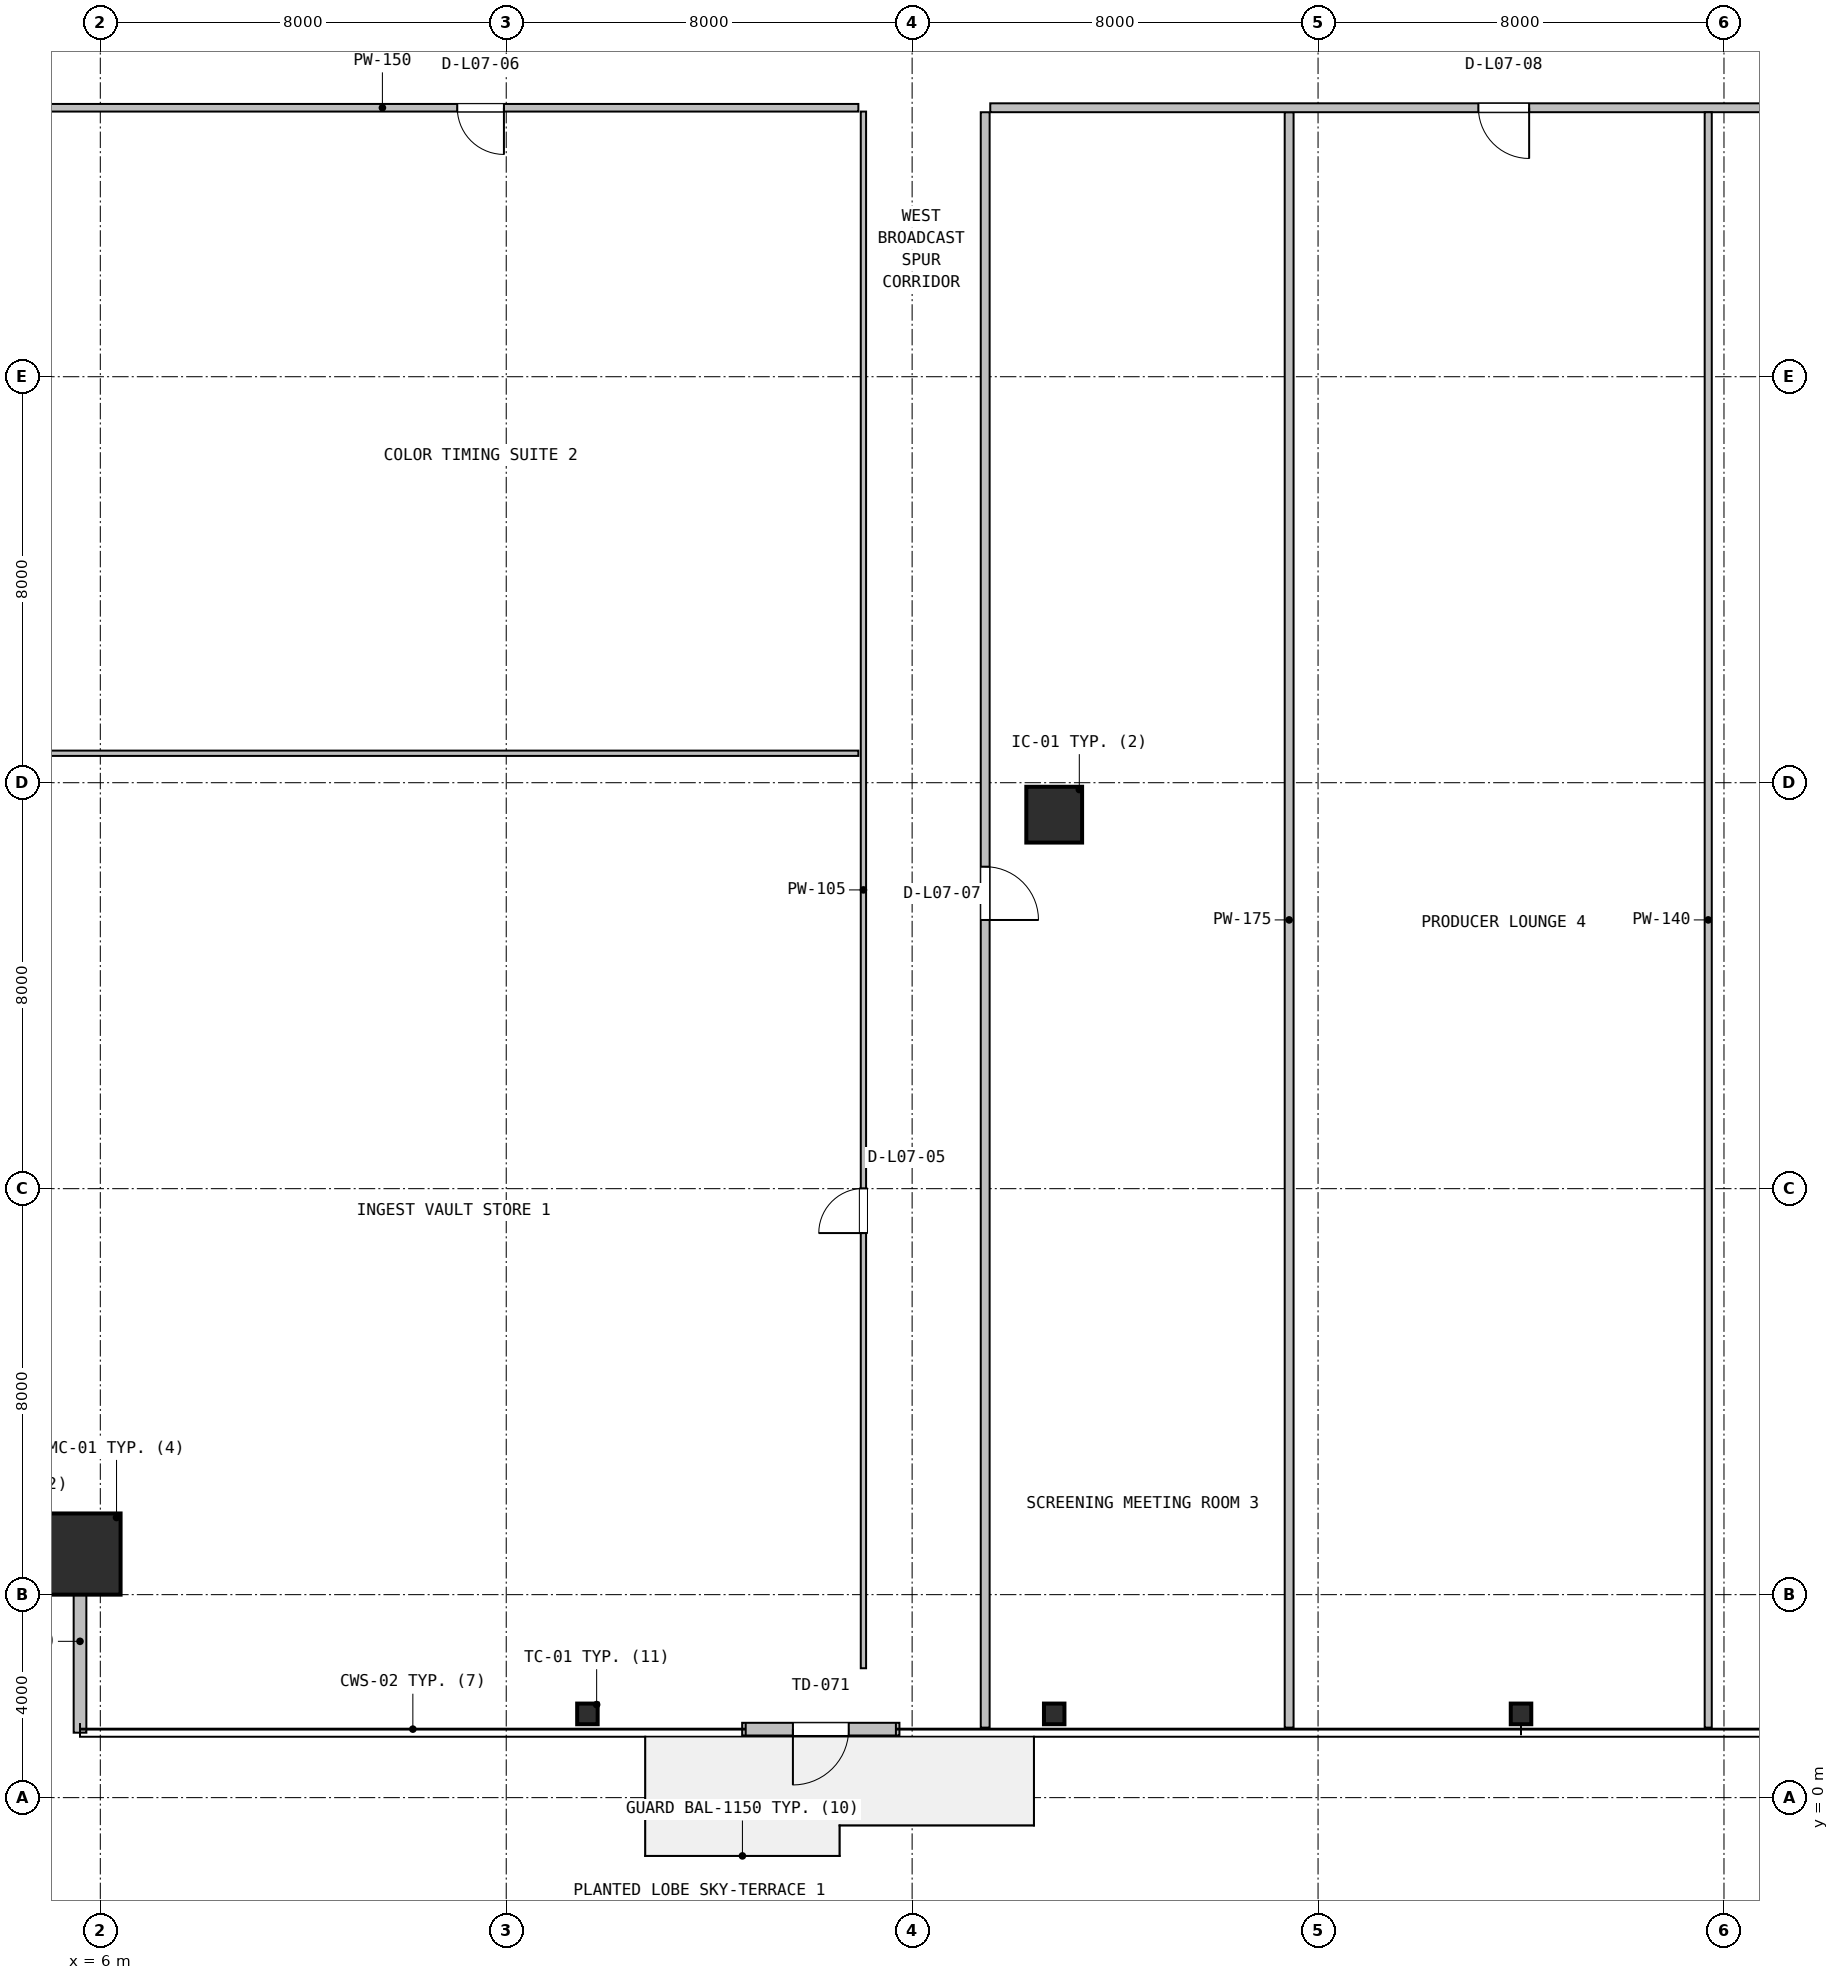
"""IFC4 building model, lengths in metres.
Left out: names, types, materials, properties, quantities, classifications, styles, units other than length and angle.
Written with IfcOpenShell. Run it as: python <this file> out.ifc"""

import sys

from ifc_helpers import new_model, si_unit, direction, frame, frame_2d, origin, origin_2d, place, context, subcontext, project, spatial, rectangle, hollow_rectangle, i_section, extrude, source, transform, mapped, element, fill, save


model = new_model("IFC4")
c1 = context("Model", 3, precision=1e-05, world=origin(), true_north=direction((0.0, 1.0)))
c2 = subcontext(c1, "Body", "Model", "MODEL_VIEW")
j1 = project(units=[si_unit("LENGTHUNIT", "METRE"), si_unit("PLANEANGLEUNIT", "RADIAN")], contexts=[c1])
p1 = place(None, origin())
s1 = spatial("IfcSite", under=j1, at=p1, CompositionType="ELEMENT")
p2 = place(p1, origin())
s2 = spatial("IfcBuilding", under=s1, at=p2, CompositionType="ELEMENT")
p3 = place(p2, frame((0.0, 0.0, 35.4)))
s3 = spatial("IfcBuildingStorey", under=s2, at=p3, CompositionType="ELEMENT", Elevation=35.4)
m1 = source(origin(), c2, "Body", "SweptSolid", [
    extrude(hollow_rectangle(XDim=1.6, YDim=1.6, WallThickness=0.06, at=origin_2d()), origin(), (0.0, 0.0, 1.0), 3.9),
])
p4 = place(p3, frame((5.6, 4.8, 0.0), z_axis=(0.0, 0.0, 1.0), x_axis=(1.0, 0.0, 0.0)))
e1 = element("IfcColumn", 1, at=p4, inside=s3, PredefinedType="COLUMN", context=c2, shape_type="MappedRepresentation", body=[
    mapped(m1, transform((0.0, 0.0, 0.0), x_axis=(1.0, 0.0, 0.0), y_axis=(0.0, 1.0, 0.0), z_axis=(0.0, 0.0, 1.0), scale=1.0)),
])
m2 = source(origin(), c2, "Body", "SweptSolid", [
    extrude(i_section(OverallWidth=0.404, OverallDepth=0.407, WebThickness=0.027, FlangeThickness=0.044, FilletRadius=0.018, at=origin_2d()), origin(), (0.0, 0.0, 1.0), 3.9),
])
for number, where, z_axis, x_axis in (
    (2, (15.6, 1.65, 0.0), (0.0, 0.0, 1.0), (1.0, 0.0, 0.0)),
    (3, (24.8, 1.65, 0.0), (0.0, 0.0, 1.0), (1.0, 0.0, 0.0)),
    (4, (34.0, 1.65, 0.0), (0.0, 0.0, 1.0), (1.0, 0.0, 0.0)),
):
    element("IfcColumn", number, at=place(p3, frame(where, z_axis=z_axis, x_axis=x_axis)), inside=s3, PredefinedType="COLUMN", context=c2, shape_type="MappedRepresentation", body=[
        mapped(m2, transform((0.0, 0.0, 0.0), x_axis=(1.0, 0.0, 0.0), y_axis=(0.0, 1.0, 0.0), z_axis=(0.0, 0.0, 1.0), scale=1.0)),
    ])
m3 = source(origin(), c2, "Body", "SweptSolid", [
    extrude(rectangle(XDim=1.1, YDim=1.1, at=origin_2d()), origin(), (0.0, 0.0, 1.0), 3.9),
])
p5 = place(p3, frame((24.8, 19.37, 0.0), z_axis=(0.0, 0.0, 1.0), x_axis=(1.0, 0.0, 0.0)))
e5 = element("IfcColumn", 5, at=p5, inside=s3, PredefinedType="COLUMN", context=c2, shape_type="MappedRepresentation", body=[
    mapped(m3, transform((0.0, 0.0, 0.0), x_axis=(1.0, 0.0, 0.0), y_axis=(0.0, 1.0, 0.0), z_axis=(0.0, 0.0, 1.0), scale=1.0)),
])
p6 = place(p3, frame((18.65, 1.35, 0.0), z_axis=(0.0, 0.0, 1.0), x_axis=(1.0, 0.0, 0.0)))
e6 = element("IfcWall", 6, at=p6, inside=s3, PredefinedType="SOLIDWALL", context=c2, shape_type="SweptSolid", body=[
    extrude(rectangle(XDim=3.1, YDim=0.25, at=frame_2d((1.55, 0.0))), origin(), (0.0, 0.0, 1.0), 3.63),
])
p7 = place(p6, frame((1.0, 0.0, 0.0)))
e7 = element("IfcOpeningElement", 7, at=p7, cuts=e6, PredefinedType="OPENING", context=c2, shape_type="SweptSolid", body=[
    extrude(rectangle(XDim=1.1, YDim=2.15, at=frame_2d((0.55, 1.075))), frame((0.0, 0.135, 0.0), z_axis=(0.0, -1.0, 0.0), x_axis=(1.0, 0.0, 0.0)), (0.0, 0.0, 1.0), 0.27),
])
p8 = place(p3, frame((5.6, 1.28, 0.0), z_axis=(0.0, 0.0, 1.0), x_axis=(0.0, 1.0, 0.0)))
e8 = element("IfcWall", 8, at=p8, inside=s3, PredefinedType="SOLIDWALL", context=c2, shape_type="SweptSolid", body=[
    extrude(rectangle(XDim=3.6, YDim=0.25, at=frame_2d((1.8, 0.0))), origin(), (0.0, 0.0, 1.0), 3.208),
])
p9 = place(p3, frame((21.04, 2.55, 0.0), z_axis=(0.0, 0.0, 1.0), x_axis=(0.0, 1.0, 0.0)))
e9 = element("IfcWall", 9, at=p9, inside=s3, PredefinedType="PARTITIONING", context=c2, shape_type="SweptSolid", body=[
    extrude(rectangle(XDim=30.675, YDim=0.105, at=frame_2d((15.337, 0.0))), origin(), (0.0, 0.0, 1.0), 3.322),
])
p10 = place(p9, frame((8.575, 0.0, 0.0)))
e10 = element("IfcOpeningElement", 10, at=p10, cuts=e9, PredefinedType="OPENING", context=c2, shape_type="SweptSolid", body=[
    extrude(rectangle(XDim=0.88, YDim=2.06, at=frame_2d((0.44, 1.03))), frame((0.0, 0.062, 0.0), z_axis=(0.0, -1.0, 0.0), x_axis=(1.0, 0.0, 0.0)), (0.0, 0.0, 1.0), 0.125),
])
p11 = place(p3, frame((2.18, 20.58, 0.0), z_axis=(0.0, 0.0, 1.0), x_axis=(1.0, 0.0, 0.0)))
e11 = element("IfcWall", 11, at=p11, inside=s3, PredefinedType="PARTITIONING", context=c2, shape_type="SweptSolid", body=[
    extrude(rectangle(XDim=18.76, YDim=0.105, at=frame_2d((9.38, 0.0))), origin(), (0.0, 0.0, 1.0), 3.208),
])
p12 = place(p3, frame((2.18, 33.3, 0.0), z_axis=(0.0, 0.0, 1.0), x_axis=(1.0, 0.0, 0.0)))
e12 = element("IfcWall", 12, at=p12, inside=s3, PredefinedType="PARTITIONING", context=c2, shape_type="SweptSolid", body=[
    extrude(rectangle(XDim=18.76, YDim=0.15, at=frame_2d((9.38, 0.0))), origin(), (0.0, 0.0, 1.0), 3.208),
])
p13 = place(p12, frame((10.855, 0.0, 0.0)))
e13 = element("IfcOpeningElement", 13, at=p13, cuts=e12, PredefinedType="OPENING", context=c2, shape_type="SweptSolid", body=[
    extrude(rectangle(XDim=0.92, YDim=2.08, at=frame_2d((0.46, 1.04))), frame((0.0, 0.085, 0.0), z_axis=(0.0, -1.0, 0.0), x_axis=(1.0, 0.0, 0.0)), (0.0, 0.0, 1.0), 0.17),
])
p14 = place(p3, frame((29.43, 1.38, 0.0), z_axis=(0.0, 0.0, 1.0), x_axis=(0.0, 1.0, 0.0)))
e14 = element("IfcWall", 14, at=p14, inside=s3, PredefinedType="PARTITIONING", context=c2, shape_type="SweptSolid", body=[
    extrude(rectangle(XDim=31.832, YDim=0.175, at=frame_2d((15.916, 0.0))), origin(), (0.0, 0.0, 1.0), 2.852),
])
p15 = place(p3, frame((23.54, 33.3, 0.0), z_axis=(0.0, 0.0, 1.0), x_axis=(1.0, 0.0, 0.0)))
e15 = element("IfcWall", 15, at=p15, inside=s3, PredefinedType="PARTITIONING", context=c2, shape_type="SweptSolid", body=[
    extrude(rectangle(XDim=24.79, YDim=0.175, at=frame_2d((12.395, 0.0))), origin(), (0.0, 0.0, 1.0), 2.852),
])
p16 = place(p15, frame((9.62, 0.0, 0.0)))
e16 = element("IfcOpeningElement", 16, at=p16, cuts=e15, PredefinedType="OPENING", context=c2, shape_type="SweptSolid", body=[
    extrude(rectangle(XDim=1.0, YDim=2.1, at=frame_2d((0.5, 1.05))), frame((0.0, 0.098, 0.0), z_axis=(0.0, -1.0, 0.0), x_axis=(1.0, 0.0, 0.0)), (0.0, 0.0, 1.0), 0.195),
])
p17 = place(p3, frame((23.44, 1.38, 0.0), z_axis=(0.0, 0.0, 1.0), x_axis=(0.0, 1.0, 0.0)))
e17 = element("IfcWall", 17, at=p17, inside=s3, PredefinedType="PARTITIONING", context=c2, shape_type="SweptSolid", body=[
    extrude(rectangle(XDim=31.832, YDim=0.175, at=frame_2d((15.916, 0.0))), origin(), (0.0, 0.0, 1.0), 3.208),
])
p18 = place(p17, frame((15.915, 0.0, 0.0)))
e18 = element("IfcOpeningElement", 18, at=p18, cuts=e17, PredefinedType="OPENING", context=c2, shape_type="SweptSolid", body=[
    extrude(rectangle(XDim=1.05, YDim=2.1, at=frame_2d((0.525, 1.05))), frame((0.0, 0.098, 0.0), z_axis=(0.0, -1.0, 0.0), x_axis=(1.0, 0.0, 0.0)), (0.0, 0.0, 1.0), 0.195),
])
p19 = place(p3, frame((37.69, 1.38, 0.0), z_axis=(0.0, 0.0, 1.0), x_axis=(0.0, 1.0, 0.0)))
e19 = element("IfcWall", 19, at=p19, inside=s3, PredefinedType="PARTITIONING", context=c2, shape_type="SweptSolid", body=[
    extrude(rectangle(XDim=31.832, YDim=0.14, at=frame_2d((15.916, 0.0))), origin(), (0.0, 0.0, 1.0), 2.852),
])
m4 = source(origin(), c2, "Body", "SweptSolid", [
    extrude(rectangle(XDim=1.1, YDim=2.15, at=frame_2d((0.55, 1.075))), frame((0.0, 0.025, 0.0), z_axis=(0.0, -1.0, 0.0), x_axis=(1.0, 0.0, 0.0)), (0.0, 0.0, 1.0), 0.05),
])
p20 = place(p7, frame((1.1, 0.0, 0.0), z_axis=(0.0, 0.0, 1.0), x_axis=(-1.0, 0.0, 0.0)))
e20 = element("IfcDoor", 20, at=p20, inside=s3, OperationType="SINGLE_SWING_LEFT", PredefinedType="DOOR", context=c2, shape_type="MappedRepresentation", body=[
    mapped(m4, transform((0.0, 0.0, 0.0), x_axis=(1.0, 0.0, 0.0), y_axis=(0.0, 1.0, 0.0), z_axis=(0.0, 0.0, 1.0), scale=1.0)),
])
fill(e7, e20)
m5 = source(origin(), c2, "Body", "SweptSolid", [
    extrude(rectangle(XDim=0.88, YDim=2.06, at=frame_2d((0.44, 1.03))), frame((0.0, 0.025, 0.0), z_axis=(0.0, -1.0, 0.0), x_axis=(1.0, 0.0, 0.0)), (0.0, 0.0, 1.0), 0.05),
])
p21 = place(p10, origin())
e21 = element("IfcDoor", 21, at=p21, inside=s3, OperationType="SINGLE_SWING_LEFT", PredefinedType="DOOR", context=c2, shape_type="MappedRepresentation", body=[
    mapped(m5, transform((0.0, 0.0, 0.0), x_axis=(1.0, 0.0, 0.0), y_axis=(0.0, 1.0, 0.0), z_axis=(0.0, 0.0, 1.0), scale=1.0)),
])
fill(e10, e21)
m6 = source(origin(), c2, "Body", "SweptSolid", [
    extrude(rectangle(XDim=0.92, YDim=2.08, at=frame_2d((0.46, 1.04))), frame((0.0, 0.025, 0.0), z_axis=(0.0, -1.0, 0.0), x_axis=(1.0, 0.0, 0.0)), (0.0, 0.0, 1.0), 0.05),
])
p22 = place(p13, frame((0.92, 0.0, 0.0), z_axis=(0.0, 0.0, 1.0), x_axis=(-1.0, 0.0, 0.0)))
e22 = element("IfcDoor", 22, at=p22, inside=s3, OperationType="SINGLE_SWING_RIGHT", PredefinedType="DOOR", context=c2, shape_type="MappedRepresentation", body=[
    mapped(m6, transform((0.0, 0.0, 0.0), x_axis=(1.0, 0.0, 0.0), y_axis=(0.0, 1.0, 0.0), z_axis=(0.0, 0.0, 1.0), scale=1.0)),
])
fill(e13, e22)
m7 = source(origin(), c2, "Body", "SweptSolid", [
    extrude(rectangle(XDim=1.05, YDim=2.1, at=frame_2d((0.525, 1.05))), frame((0.0, 0.025, 0.0), z_axis=(0.0, -1.0, 0.0), x_axis=(1.0, 0.0, 0.0)), (0.0, 0.0, 1.0), 0.05),
])
p23 = place(p18, frame((1.05, 0.0, 0.0), z_axis=(0.0, 0.0, 1.0), x_axis=(-1.0, 0.0, 0.0)))
e23 = element("IfcDoor", 23, at=p23, inside=s3, OperationType="SINGLE_SWING_LEFT", PredefinedType="DOOR", context=c2, shape_type="MappedRepresentation", body=[
    mapped(m7, transform((0.0, 0.0, 0.0), x_axis=(1.0, 0.0, 0.0), y_axis=(0.0, 1.0, 0.0), z_axis=(0.0, 0.0, 1.0), scale=1.0)),
])
fill(e18, e23)
m8 = source(origin(), c2, "Body", "SweptSolid", [
    extrude(rectangle(XDim=1.0, YDim=2.1, at=frame_2d((0.5, 1.05))), frame((0.0, 0.025, 0.0), z_axis=(0.0, -1.0, 0.0), x_axis=(1.0, 0.0, 0.0)), (0.0, 0.0, 1.0), 0.05),
])
p24 = place(p16, frame((1.0, 0.0, 0.0), z_axis=(0.0, 0.0, 1.0), x_axis=(-1.0, 0.0, 0.0)))
e24 = element("IfcDoor", 24, at=p24, inside=s3, OperationType="SINGLE_SWING_RIGHT", PredefinedType="DOOR", context=c2, shape_type="MappedRepresentation", body=[
    mapped(m8, transform((0.0, 0.0, 0.0), x_axis=(1.0, 0.0, 0.0), y_axis=(0.0, 1.0, 0.0), z_axis=(0.0, 0.0, 1.0), scale=1.0)),
])
fill(e16, e24)
save(model, sys.argv[1])
